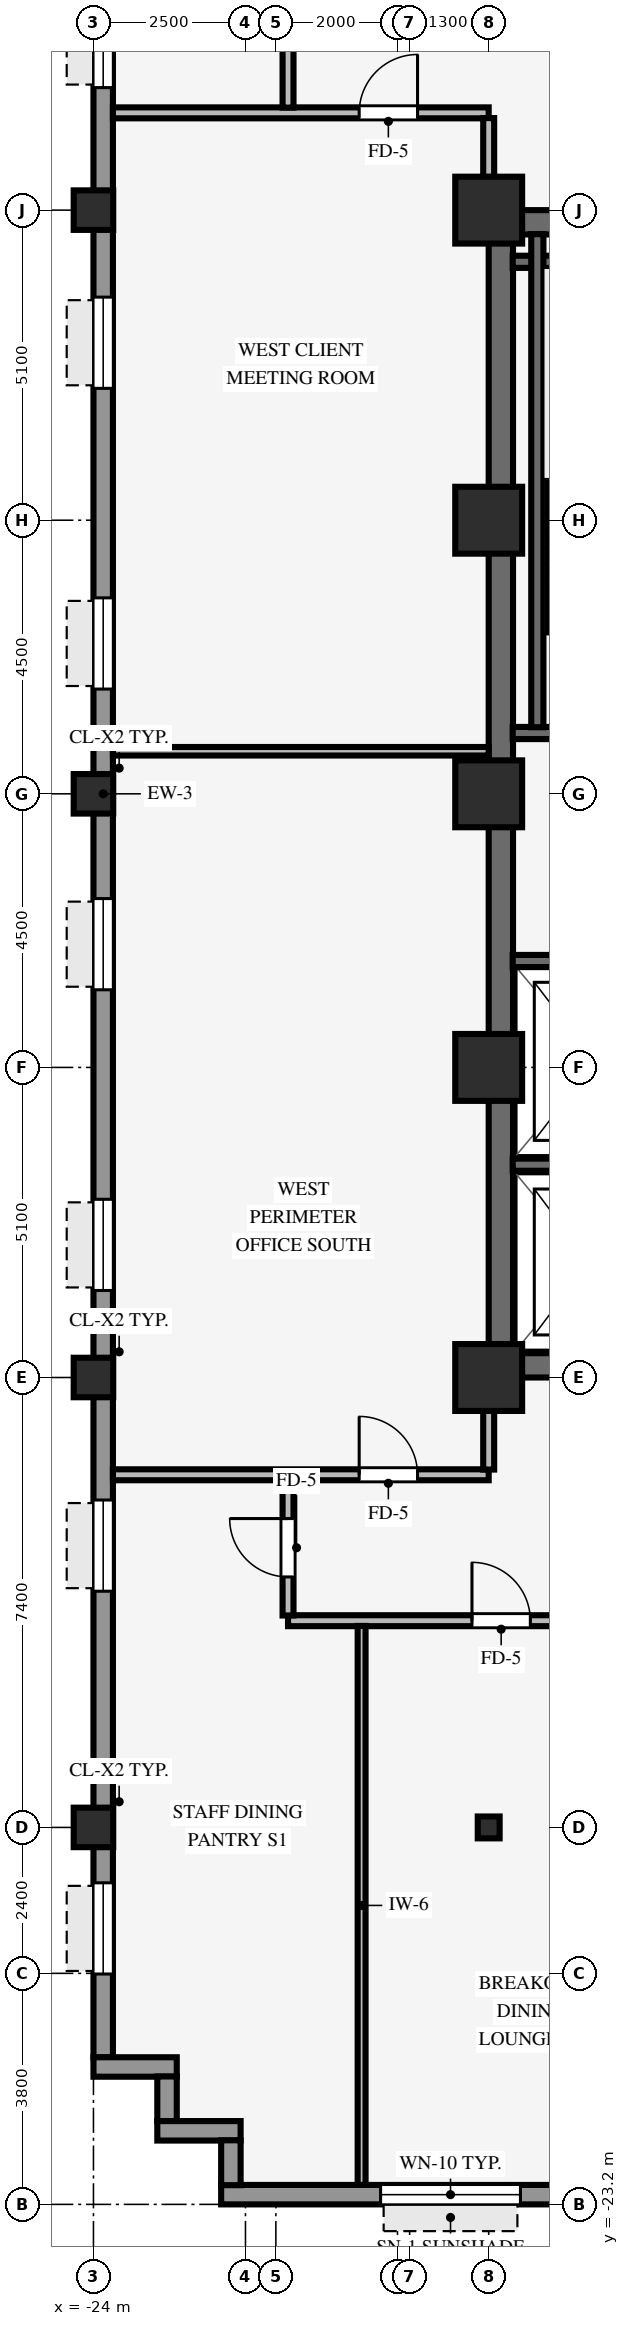
"""IFC4 building model, lengths in metres.
Left out: names, types, materials, properties, quantities, classifications, styles, units other than length and angle.
Written with IfcOpenShell. Run it as: python <this file> out.ifc"""

import sys

from ifc_helpers import new_model, si_unit, direction, frame, frame_2d, origin, origin_2d, place, context, subcontext, project, spatial, rectangle, hollow_rectangle, i_section, extrude, source, transform, mapped, element, fill, save


model = new_model("IFC4")
c1 = context("Model", 3, precision=1e-05, world=origin(), true_north=direction((0.0, 1.0)))
c2 = subcontext(c1, "Body", "Model", "MODEL_VIEW")
j1 = project(units=[si_unit("LENGTHUNIT", "METRE"), si_unit("PLANEANGLEUNIT", "RADIAN")], contexts=[c1])
p1 = place(None, origin())
s1 = spatial("IfcSite", under=j1, at=p1, CompositionType="ELEMENT")
p2 = place(p1, origin())
s2 = spatial("IfcBuilding", under=s1, at=p2, CompositionType="ELEMENT")
p3 = place(p2, frame((0.0, 0.0, 101.95)))
s3 = spatial("IfcBuildingStorey", under=s2, at=p3, CompositionType="ELEMENT", Elevation=101.95)
for number, where, z_axis, x_axis in (
    (1, (-17.5, -9.4, 0.0), (0.0, 0.0, 1.0), (1.0, 0.0, 0.0)),
    (2, (-17.5, 9.4, 0.0), (0.0, 0.0, 1.0), (1.0, 0.0, 0.0)),
):
    element("IfcWall", number, at=place(p3, frame(where, z_axis=z_axis, x_axis=x_axis)), inside=s3, PredefinedType="SHEAR", context=c2, shape_type="SweptSolid", body=[
        extrude(rectangle(XDim=8.5, YDim=0.4, at=frame_2d((4.25, 0.0))), origin(), (0.0, 0.0, 1.0), 3.37),
    ])
p4 = place(p3, frame((-17.3, -9.205, 0.0), z_axis=(0.0, 0.0, 1.0), x_axis=(0.0, 1.0, 0.0)))
e3 = element("IfcWall", 3, at=p4, inside=s3, PredefinedType="SHEAR", context=c2, shape_type="SweptSolid", body=[
    extrude(rectangle(XDim=18.41, YDim=0.4, at=frame_2d((9.205, 0.0))), origin(), (0.0, 0.0, 1.0), 3.37),
])
for number, where, z_axis, x_axis in (
    (4, (-17.5, -9.6, 0.0), (0.0, 0.0, 1.0), (1.0, 0.0, 0.0)),
    (5, (-17.5, -4.5, 0.0), (0.0, 0.0, 1.0), (1.0, 0.0, 0.0)),
    (6, (-17.5, 4.5, 0.0), (0.0, 0.0, 1.0), (1.0, 0.0, 0.0)),
    (7, (-17.5, 9.6, 0.0), (0.0, 0.0, 1.0), (1.0, 0.0, 0.0)),
    (8, (-17.5, 0.0, 0.0), (0.0, 0.0, 1.0), (1.0, 0.0, 0.0)),
):
    element("IfcColumn", number, at=place(p3, frame(where, z_axis=z_axis, x_axis=x_axis)), inside=s3, PredefinedType="COLUMN", context=c2, shape_type="SweptSolid", body=[
        extrude(rectangle(XDim=1.1, YDim=1.1, at=origin_2d()), origin(), (0.0, 0.0, 1.0), 3.37),
    ])
for number, where, z_axis, x_axis in (
    (9, (-24.0, -17.0, 0.0), (0.0, 0.0, 1.0), (1.0, 0.0, 0.0)),
    (10, (-24.0, -9.6, 0.0), (0.0, 0.0, 1.0), (1.0, 0.0, 0.0)),
    (11, (-24.0, 0.0, 0.0), (0.0, 0.0, 1.0), (1.0, 0.0, 0.0)),
    (12, (-24.0, 9.6, 0.0), (0.0, 0.0, 1.0), (1.0, 0.0, 0.0)),
):
    element("IfcColumn", number, at=place(p3, frame(where, z_axis=z_axis, x_axis=x_axis)), inside=s3, PredefinedType="COLUMN", context=c2, shape_type="SweptSolid", body=[
        extrude(hollow_rectangle(XDim=0.65, YDim=0.65, WallThickness=0.04, InnerFilletRadius=0.04, OuterFilletRadius=0.08, at=origin_2d()), origin(), (0.0, 0.0, 1.0), 3.37),
    ])
p5 = place(p3, frame((-17.5, -17.0, 0.0), z_axis=(0.0, 0.0, 1.0), x_axis=(1.0, 0.0, 0.0)))
e13 = element("IfcColumn", 13, at=p5, inside=s3, PredefinedType="COLUMN", context=c2, shape_type="SweptSolid", body=[
    extrude(i_section(OverallWidth=0.36, OverallDepth=0.36, WebThickness=0.021, FlangeThickness=0.021, FilletRadius=0.018, at=origin_2d()), origin(), (0.0, 0.0, 1.0), 3.37),
])
p6 = place(p3, frame((-21.9, -23.04, 0.0), z_axis=(0.0, 0.0, 1.0), x_axis=(1.0, 0.0, 0.0)))
e14 = element("IfcWall", 14, at=p6, inside=s3, PredefinedType="STANDARD", context=c2, shape_type="SweptSolid", body=[
    extrude(rectangle(XDim=43.8, YDim=0.32, at=frame_2d((21.9, 0.0))), origin(), (0.0, 0.0, 1.0), 2.705),
])
p7 = place(p6, frame((17.58, 0.0, 0.0), z_axis=(0.0, 0.0, 1.0), x_axis=(-1.0, 0.0, 0.0)))
e15 = element("IfcOpeningElement", 15, at=p7, cuts=e14, PredefinedType="OPENING", context=c2, shape_type="SweptSolid", body=[
    extrude(rectangle(XDim=0.98, YDim=2.15, at=frame_2d((0.49, 1.075))), frame((0.0, 0.17, 0.0), z_axis=(0.0, -1.0, 0.0), x_axis=(1.0, 0.0, 0.0)), (0.0, 0.0, 1.0), 0.34),
])
p8 = place(p6, frame((2.622, 0.0, 0.8)))
e16 = element("IfcOpeningElement", 16, at=p8, cuts=e14, PredefinedType="OPENING", context=c2, shape_type="SweptSolid", body=[
    extrude(rectangle(XDim=2.3, YDim=1.62, at=frame_2d((1.15, 0.81))), frame((0.0, 0.17, 0.0), z_axis=(0.0, -1.0, 0.0), x_axis=(1.0, 0.0, 0.0)), (0.0, 0.0, 1.0), 0.34),
])
p9 = place(p6, frame((8.167, 0.0, 0.8)))
e17 = element("IfcOpeningElement", 17, at=p9, cuts=e14, PredefinedType="OPENING", context=c2, shape_type="SweptSolid", body=[
    extrude(rectangle(XDim=2.3, YDim=1.62, at=frame_2d((1.15, 0.81))), frame((0.0, 0.17, 0.0), z_axis=(0.0, -1.0, 0.0), x_axis=(1.0, 0.0, 0.0)), (0.0, 0.0, 1.0), 0.34),
])
p10 = place(p6, frame((24.044, 0.0, 0.8)))
e18 = element("IfcOpeningElement", 18, at=p10, cuts=e14, PredefinedType="OPENING", context=c2, shape_type="SweptSolid", body=[
    extrude(rectangle(XDim=2.3, YDim=1.62, at=frame_2d((1.15, 0.81))), frame((0.0, 0.17, 0.0), z_axis=(0.0, -1.0, 0.0), x_axis=(1.0, 0.0, 0.0)), (0.0, 0.0, 1.0), 0.34),
])
p11 = place(p6, frame((34.233, 0.0, 0.8)))
e19 = element("IfcOpeningElement", 19, at=p11, cuts=e14, PredefinedType="OPENING", context=c2, shape_type="SweptSolid", body=[
    extrude(rectangle(XDim=2.3, YDim=1.62, at=frame_2d((1.15, 0.81))), frame((0.0, 0.17, 0.0), z_axis=(0.0, -1.0, 0.0), x_axis=(1.0, 0.0, 0.0)), (0.0, 0.0, 1.0), 0.34),
])
p12 = place(p6, frame((38.878, 0.0, 0.8)))
e20 = element("IfcOpeningElement", 20, at=p12, cuts=e14, PredefinedType="OPENING", context=c2, shape_type="SweptSolid", body=[
    extrude(rectangle(XDim=2.3, YDim=1.62, at=frame_2d((1.15, 0.81))), frame((0.0, 0.17, 0.0), z_axis=(0.0, -1.0, 0.0), x_axis=(1.0, 0.0, 0.0)), (0.0, 0.0, 1.0), 0.34),
])
p13 = place(p3, frame((-23.84, -20.784, 0.0), z_axis=(0.0, 0.0, 1.0), x_axis=(0.0, 1.0, 0.0)))
e21 = element("IfcWall", 21, at=p13, inside=s3, PredefinedType="STANDARD", context=c2, shape_type="SweptSolid", body=[
    extrude(rectangle(XDim=41.568, YDim=0.32, at=frame_2d((20.784, 0.0))), origin(), (0.0, 0.0, 1.0), 2.705),
])
p14 = place(p13, frame((1.373, 0.0, 0.8)))
e22 = element("IfcOpeningElement", 22, at=p14, cuts=e21, PredefinedType="OPENING", context=c2, shape_type="SweptSolid", body=[
    extrude(rectangle(XDim=1.5, YDim=1.6, at=frame_2d((0.75, 0.8))), frame((0.0, 0.17, 0.0), z_axis=(0.0, -1.0, 0.0), x_axis=(1.0, 0.0, 0.0)), (0.0, 0.0, 1.0), 0.34),
])
p15 = place(p13, frame((7.669, 0.0, 0.8)))
e23 = element("IfcOpeningElement", 23, at=p15, cuts=e21, PredefinedType="OPENING", context=c2, shape_type="SweptSolid", body=[
    extrude(rectangle(XDim=1.5, YDim=1.6, at=frame_2d((0.75, 0.8))), frame((0.0, 0.17, 0.0), z_axis=(0.0, -1.0, 0.0), x_axis=(1.0, 0.0, 0.0)), (0.0, 0.0, 1.0), 0.34),
])
p16 = place(p13, frame((12.615, 0.0, 0.8)))
e24 = element("IfcOpeningElement", 24, at=p16, cuts=e21, PredefinedType="OPENING", context=c2, shape_type="SweptSolid", body=[
    extrude(rectangle(XDim=1.5, YDim=1.6, at=frame_2d((0.75, 0.8))), frame((0.0, 0.17, 0.0), z_axis=(0.0, -1.0, 0.0), x_axis=(1.0, 0.0, 0.0)), (0.0, 0.0, 1.0), 0.34),
])
p17 = place(p13, frame((17.561, 0.0, 0.8)))
e25 = element("IfcOpeningElement", 25, at=p17, cuts=e21, PredefinedType="OPENING", context=c2, shape_type="SweptSolid", body=[
    extrude(rectangle(XDim=1.5, YDim=1.6, at=frame_2d((0.75, 0.8))), frame((0.0, 0.17, 0.0), z_axis=(0.0, -1.0, 0.0), x_axis=(1.0, 0.0, 0.0)), (0.0, 0.0, 1.0), 0.34),
])
p18 = place(p13, frame((22.507, 0.0, 0.8)))
e26 = element("IfcOpeningElement", 26, at=p18, cuts=e21, PredefinedType="OPENING", context=c2, shape_type="SweptSolid", body=[
    extrude(rectangle(XDim=1.5, YDim=1.6, at=frame_2d((0.75, 0.8))), frame((0.0, 0.17, 0.0), z_axis=(0.0, -1.0, 0.0), x_axis=(1.0, 0.0, 0.0)), (0.0, 0.0, 1.0), 0.34),
])
p19 = place(p13, frame((27.453, 0.0, 0.8)))
e27 = element("IfcOpeningElement", 27, at=p19, cuts=e21, PredefinedType="OPENING", context=c2, shape_type="SweptSolid", body=[
    extrude(rectangle(XDim=1.5, YDim=1.6, at=frame_2d((0.75, 0.8))), frame((0.0, 0.17, 0.0), z_axis=(0.0, -1.0, 0.0), x_axis=(1.0, 0.0, 0.0)), (0.0, 0.0, 1.0), 0.34),
])
p20 = place(p13, frame((32.399, 0.0, 0.8)))
e28 = element("IfcOpeningElement", 28, at=p20, cuts=e21, PredefinedType="OPENING", context=c2, shape_type="SweptSolid", body=[
    extrude(rectangle(XDim=1.5, YDim=1.6, at=frame_2d((0.75, 0.8))), frame((0.0, 0.17, 0.0), z_axis=(0.0, -1.0, 0.0), x_axis=(1.0, 0.0, 0.0)), (0.0, 0.0, 1.0), 0.34),
])
p21 = place(p13, frame((38.695, 0.0, 0.8)))
e29 = element("IfcOpeningElement", 29, at=p21, cuts=e21, PredefinedType="OPENING", context=c2, shape_type="SweptSolid", body=[
    extrude(rectangle(XDim=1.5, YDim=1.6, at=frame_2d((0.75, 0.8))), frame((0.0, 0.17, 0.0), z_axis=(0.0, -1.0, 0.0), x_axis=(1.0, 0.0, 0.0)), (0.0, 0.0, 1.0), 0.34),
])
p22 = place(p3, frame((-24.0, -20.94, 0.0), z_axis=(0.0, 0.0, 1.0), x_axis=(1.0, 0.0, 0.0)))
e30 = element("IfcWall", 30, at=p22, inside=s3, PredefinedType="STANDARD", context=c2, shape_type="SweptSolid", body=[
    extrude(rectangle(XDim=1.37, YDim=0.32, at=frame_2d((0.685, 0.0))), origin(), (0.0, 0.0, 1.0), 3.36),
])
p23 = place(p3, frame((-22.79, -21.834, 0.0), z_axis=(0.0, 0.0, 1.0), x_axis=(0.0, 1.0, 0.0)))
e31 = element("IfcWall", 31, at=p23, inside=s3, PredefinedType="STANDARD", context=c2, shape_type="SweptSolid", body=[
    extrude(rectangle(XDim=0.738, YDim=0.32, at=frame_2d((0.369, 0.0))), origin(), (0.0, 0.0, 1.0), 3.36),
])
p24 = place(p3, frame((-22.95, -21.99, 0.0), z_axis=(0.0, 0.0, 1.0), x_axis=(1.0, 0.0, 0.0)))
e32 = element("IfcWall", 32, at=p24, inside=s3, PredefinedType="STANDARD", context=c2, shape_type="SweptSolid", body=[
    extrude(rectangle(XDim=1.37, YDim=0.32, at=frame_2d((0.685, 0.0))), origin(), (0.0, 0.0, 1.0), 3.36),
])
p25 = place(p3, frame((-21.74, -22.884, 0.0), z_axis=(0.0, 0.0, 1.0), x_axis=(0.0, 1.0, 0.0)))
e33 = element("IfcWall", 33, at=p25, inside=s3, PredefinedType="STANDARD", context=c2, shape_type="SweptSolid", body=[
    extrude(rectangle(XDim=0.738, YDim=0.32, at=frame_2d((0.369, 0.0))), origin(), (0.0, 0.0, 1.0), 3.36),
])
for number, where, z_axis, x_axis in (
    (34, (-17.105, 1.0, 0.0), (0.0, 0.0, 1.0), (1.0, 0.0, 0.0)),
    (35, (-17.105, 8.75, 0.0), (0.0, 0.0, 1.0), (1.0, 0.0, 0.0)),
):
    element("IfcWall", number, at=place(p3, frame(where, z_axis=z_axis, x_axis=x_axis)), inside=s3, PredefinedType="SHEAR", context=c2, shape_type="SweptSolid", body=[
        extrude(rectangle(XDim=3.57, YDim=0.2, at=frame_2d((1.785, 0.0))), origin(), (0.0, 0.0, 1.0), 3.37),
    ])
p26 = place(p3, frame((-16.7, 1.095, 0.0), z_axis=(0.0, 0.0, 1.0), x_axis=(0.0, 1.0, 0.0)))
e36 = element("IfcWall", 36, at=p26, inside=s3, PredefinedType="SHEAR", context=c2, shape_type="SweptSolid", body=[
    extrude(rectangle(XDim=8.11, YDim=0.2, at=frame_2d((4.055, 0.0))), origin(), (0.0, 0.0, 1.0), 3.37),
])
p27 = place(p3, frame((-17.105, -6.1, 0.0), z_axis=(0.0, 0.0, 1.0), x_axis=(1.0, 0.0, 0.0)))
e37 = element("IfcWall", 37, at=p27, inside=s3, PredefinedType="SHEAR", context=c2, shape_type="SweptSolid", body=[
    extrude(rectangle(XDim=2.855, YDim=0.2, at=frame_2d((1.427, 0.0))), origin(), (0.0, 0.0, 1.0), 3.37),
])
p28 = place(p3, frame((-17.105, -2.75, 0.0), z_axis=(0.0, 0.0, 1.0), x_axis=(1.0, 0.0, 0.0)))
e38 = element("IfcWall", 38, at=p28, inside=s3, PredefinedType="SHEAR", context=c2, shape_type="SweptSolid", body=[
    extrude(rectangle(XDim=2.66, YDim=0.2, at=frame_2d((1.33, 0.0))), origin(), (0.0, 0.0, 1.0), 3.37),
])
p29 = place(p3, frame((-20.8, -13.6, 0.0), z_axis=(0.0, 0.0, 1.0), x_axis=(1.0, 0.0, 0.0)))
e39 = element("IfcWall", 39, at=p29, inside=s3, PredefinedType="PARTITIONING", context=c2, shape_type="SweptSolid", body=[
    extrude(rectangle(XDim=5.8, YDim=0.18, at=frame_2d((2.9, 0.0))), origin(), (0.0, 0.0, 1.0), 2.998),
])
p30 = place(p29, frame((3.025, 0.0, 0.0)))
e40 = element("IfcOpeningElement", 40, at=p30, cuts=e39, PredefinedType="OPENING", context=c2, shape_type="SweptSolid", body=[
    extrude(rectangle(XDim=0.96, YDim=2.1, at=frame_2d((0.48, 1.05))), frame((0.0, 0.1, 0.0), z_axis=(0.0, -1.0, 0.0), x_axis=(1.0, 0.0, 0.0)), (0.0, 0.0, 1.0), 0.2),
])
p31 = place(p3, frame((-23.68, -11.2, 0.0), z_axis=(0.0, 0.0, 1.0), x_axis=(1.0, 0.0, 0.0)))
e41 = element("IfcWall", 41, at=p31, inside=s3, PredefinedType="PARTITIONING", context=c2, shape_type="SweptSolid", body=[
    extrude(rectangle(XDim=6.18, YDim=0.18, at=frame_2d((3.09, 0.0))), origin(), (0.0, 0.0, 1.0), 3.36),
])
p32 = place(p31, frame((4.05, 0.0, 0.0)))
e42 = element("IfcOpeningElement", 42, at=p32, cuts=e41, PredefinedType="OPENING", context=c2, shape_type="SweptSolid", body=[
    extrude(rectangle(XDim=0.96, YDim=2.1, at=frame_2d((0.48, 1.05))), frame((0.0, 0.1, 0.0), z_axis=(0.0, -1.0, 0.0), x_axis=(1.0, 0.0, 0.0)), (0.0, 0.0, 1.0), 0.2),
])
p33 = place(p3, frame((-23.68, 0.7, 0.0), z_axis=(0.0, 0.0, 1.0), x_axis=(1.0, 0.0, 0.0)))
e43 = element("IfcWall", 43, at=p33, inside=s3, PredefinedType="PARTITIONING", context=c2, shape_type="SweptSolid", body=[
    extrude(rectangle(XDim=6.18, YDim=0.14, at=frame_2d((3.09, 0.0))), origin(), (0.0, 0.0, 1.0), 3.36),
])
p34 = place(p3, frame((-23.68, 11.2, 0.0), z_axis=(0.0, 0.0, 1.0), x_axis=(1.0, 0.0, 0.0)))
e44 = element("IfcWall", 44, at=p34, inside=s3, PredefinedType="PARTITIONING", context=c2, shape_type="SweptSolid", body=[
    extrude(rectangle(XDim=6.18, YDim=0.18, at=frame_2d((3.09, 0.0))), origin(), (0.0, 0.0, 1.0), 3.36),
])
p35 = place(p34, frame((4.05, 0.0, 0.0)))
e45 = element("IfcOpeningElement", 45, at=p35, cuts=e44, PredefinedType="OPENING", context=c2, shape_type="SweptSolid", body=[
    extrude(rectangle(XDim=0.96, YDim=2.1, at=frame_2d((0.48, 1.05))), frame((0.0, 0.1, 0.0), z_axis=(0.0, -1.0, 0.0), x_axis=(1.0, 0.0, 0.0)), (0.0, 0.0, 1.0), 0.2),
])
p36 = place(p3, frame((-20.8, -13.514, 0.0), z_axis=(0.0, 0.0, 1.0), x_axis=(0.0, 1.0, 0.0)))
e46 = element("IfcWall", 46, at=p36, inside=s3, PredefinedType="PARTITIONING", context=c2, shape_type="SweptSolid", body=[
    extrude(rectangle(XDim=2.228, YDim=0.18, at=frame_2d((1.114, 0.0))), origin(), (0.0, 0.0, 1.0), 3.36),
])
p37 = place(p36, frame((0.634, 0.0, 0.0)))
e47 = element("IfcOpeningElement", 47, at=p37, cuts=e46, PredefinedType="OPENING", context=c2, shape_type="SweptSolid", body=[
    extrude(rectangle(XDim=0.96, YDim=2.1, at=frame_2d((0.48, 1.05))), frame((0.0, 0.1, 0.0), z_axis=(0.0, -1.0, 0.0), x_axis=(1.0, 0.0, 0.0)), (0.0, 0.0, 1.0), 0.2),
])
p38 = place(p3, frame((-20.8, 11.286, 0.0), z_axis=(0.0, 0.0, 1.0), x_axis=(0.0, 1.0, 0.0)))
e48 = element("IfcWall", 48, at=p38, inside=s3, PredefinedType="PARTITIONING", context=c2, shape_type="SweptSolid", body=[
    extrude(rectangle(XDim=2.228, YDim=0.18, at=frame_2d((1.114, 0.0))), origin(), (0.0, 0.0, 1.0), 3.36),
])
p39 = place(p3, frame((-19.59, -22.88, 0.0), z_axis=(0.0, 0.0, 1.0), x_axis=(0.0, 1.0, 0.0)))
e49 = element("IfcWall", 49, at=p39, inside=s3, PredefinedType="PARTITIONING", context=c2, shape_type="SweptSolid", body=[
    extrude(rectangle(XDim=9.194, YDim=0.13, at=frame_2d((4.597, 0.0))), origin(), (0.0, 0.0, 1.0), 3.36),
])
for number, where, z_axis, x_axis in (
    (50, (-17.5, -11.114, 0.0), (0.0, 0.0, 1.0), (0.0, 1.0, 0.0)),
    (51, (-17.5, 10.146, 0.0), (0.0, 0.0, 1.0), (0.0, 1.0, 0.0)),
):
    element("IfcWall", number, at=place(p3, frame(where, z_axis=z_axis, x_axis=x_axis)), inside=s3, PredefinedType="PARTITIONING", context=c2, shape_type="SweptSolid", body=[
        extrude(rectangle(XDim=0.968, YDim=0.18, at=frame_2d((0.484, 0.0))), origin(), (0.0, 0.0, 1.0), 2.738),
    ])
m1 = source(origin(), c2, "Body", "SweptSolid", [
    extrude(rectangle(XDim=2.3, YDim=1.62, at=frame_2d((1.15, 0.81))), frame((0.0, 0.03, 0.0), z_axis=(0.0, -1.0, 0.0), x_axis=(1.0, 0.0, 0.0)), (0.0, 0.0, 1.0), 0.06),
])
p40 = place(p8, origin())
e52 = element("IfcWindow", 52, at=p40, inside=s3, PartitioningType="SINGLE_PANEL", PredefinedType="WINDOW", context=c2, shape_type="MappedRepresentation", body=[
    mapped(m1, transform((0.0, 0.0, 0.0), scale=1.0)),
])
fill(e16, e52)
m2 = source(origin(), c2, "Body", "SweptSolid", [
    extrude(rectangle(XDim=1.5, YDim=1.6, at=frame_2d((0.75, 0.8))), frame((0.0, 0.03, 0.0), z_axis=(0.0, -1.0, 0.0), x_axis=(1.0, 0.0, 0.0)), (0.0, 0.0, 1.0), 0.06),
])
p41 = place(p14, origin())
e53 = element("IfcWindow", 53, at=p41, inside=s3, PartitioningType="SINGLE_PANEL", PredefinedType="WINDOW", context=c2, shape_type="MappedRepresentation", body=[
    mapped(m2, transform((0.0, 0.0, 0.0), scale=1.0)),
])
fill(e22, e53)
p42 = place(p15, origin())
e54 = element("IfcWindow", 54, at=p42, inside=s3, PartitioningType="SINGLE_PANEL", PredefinedType="WINDOW", context=c2, shape_type="MappedRepresentation", body=[
    mapped(m2, transform((0.0, 0.0, 0.0), scale=1.0)),
])
fill(e23, e54)
p43 = place(p16, origin())
e55 = element("IfcWindow", 55, at=p43, inside=s3, PartitioningType="SINGLE_PANEL", PredefinedType="WINDOW", context=c2, shape_type="MappedRepresentation", body=[
    mapped(m2, transform((0.0, 0.0, 0.0), scale=1.0)),
])
fill(e24, e55)
p44 = place(p17, origin())
e56 = element("IfcWindow", 56, at=p44, inside=s3, PartitioningType="SINGLE_PANEL", PredefinedType="WINDOW", context=c2, shape_type="MappedRepresentation", body=[
    mapped(m2, transform((0.0, 0.0, 0.0), scale=1.0)),
])
fill(e25, e56)
p45 = place(p18, origin())
e57 = element("IfcWindow", 57, at=p45, inside=s3, PartitioningType="SINGLE_PANEL", PredefinedType="WINDOW", context=c2, shape_type="MappedRepresentation", body=[
    mapped(m2, transform((0.0, 0.0, 0.0), scale=1.0)),
])
fill(e26, e57)
p46 = place(p19, origin())
e58 = element("IfcWindow", 58, at=p46, inside=s3, PartitioningType="SINGLE_PANEL", PredefinedType="WINDOW", context=c2, shape_type="MappedRepresentation", body=[
    mapped(m2, transform((0.0, 0.0, 0.0), scale=1.0)),
])
fill(e27, e58)
p47 = place(p20, origin())
e59 = element("IfcWindow", 59, at=p47, inside=s3, PartitioningType="SINGLE_PANEL", PredefinedType="WINDOW", context=c2, shape_type="MappedRepresentation", body=[
    mapped(m2, transform((0.0, 0.0, 0.0), scale=1.0)),
])
fill(e28, e59)
m3 = source(origin(), c2, "Body", "SweptSolid", [
    extrude(rectangle(XDim=0.96, YDim=2.1, at=frame_2d((0.48, 1.05))), frame((0.0, 0.025, 0.0), z_axis=(0.0, -1.0, 0.0), x_axis=(1.0, 0.0, 0.0)), (0.0, 0.0, 1.0), 0.05),
])
p48 = place(p30, origin())
e60 = element("IfcDoor", 60, at=p48, inside=s3, OperationType="SINGLE_SWING_LEFT", PredefinedType="DOOR", context=c2, shape_type="MappedRepresentation", body=[
    mapped(m3, transform((0.0, 0.0, 0.0), scale=1.0)),
])
fill(e40, e60)
p49 = place(p32, origin())
e61 = element("IfcDoor", 61, at=p49, inside=s3, OperationType="SINGLE_SWING_LEFT", PredefinedType="DOOR", context=c2, shape_type="MappedRepresentation", body=[
    mapped(m3, transform((0.0, 0.0, 0.0), scale=1.0)),
])
fill(e42, e61)
p50 = place(p35, origin())
e62 = element("IfcDoor", 62, at=p50, inside=s3, OperationType="SINGLE_SWING_RIGHT", PredefinedType="DOOR", context=c2, shape_type="MappedRepresentation", body=[
    mapped(m3, transform((0.0, 0.0, 0.0), scale=1.0)),
])
fill(e45, e62)
p51 = place(p37, origin())
e63 = element("IfcDoor", 63, at=p51, inside=s3, OperationType="SINGLE_SWING_RIGHT", PredefinedType="DOOR", context=c2, shape_type="MappedRepresentation", body=[
    mapped(m3, transform((0.0, 0.0, 0.0), scale=1.0)),
])
fill(e47, e63)
save(model, sys.argv[1])
